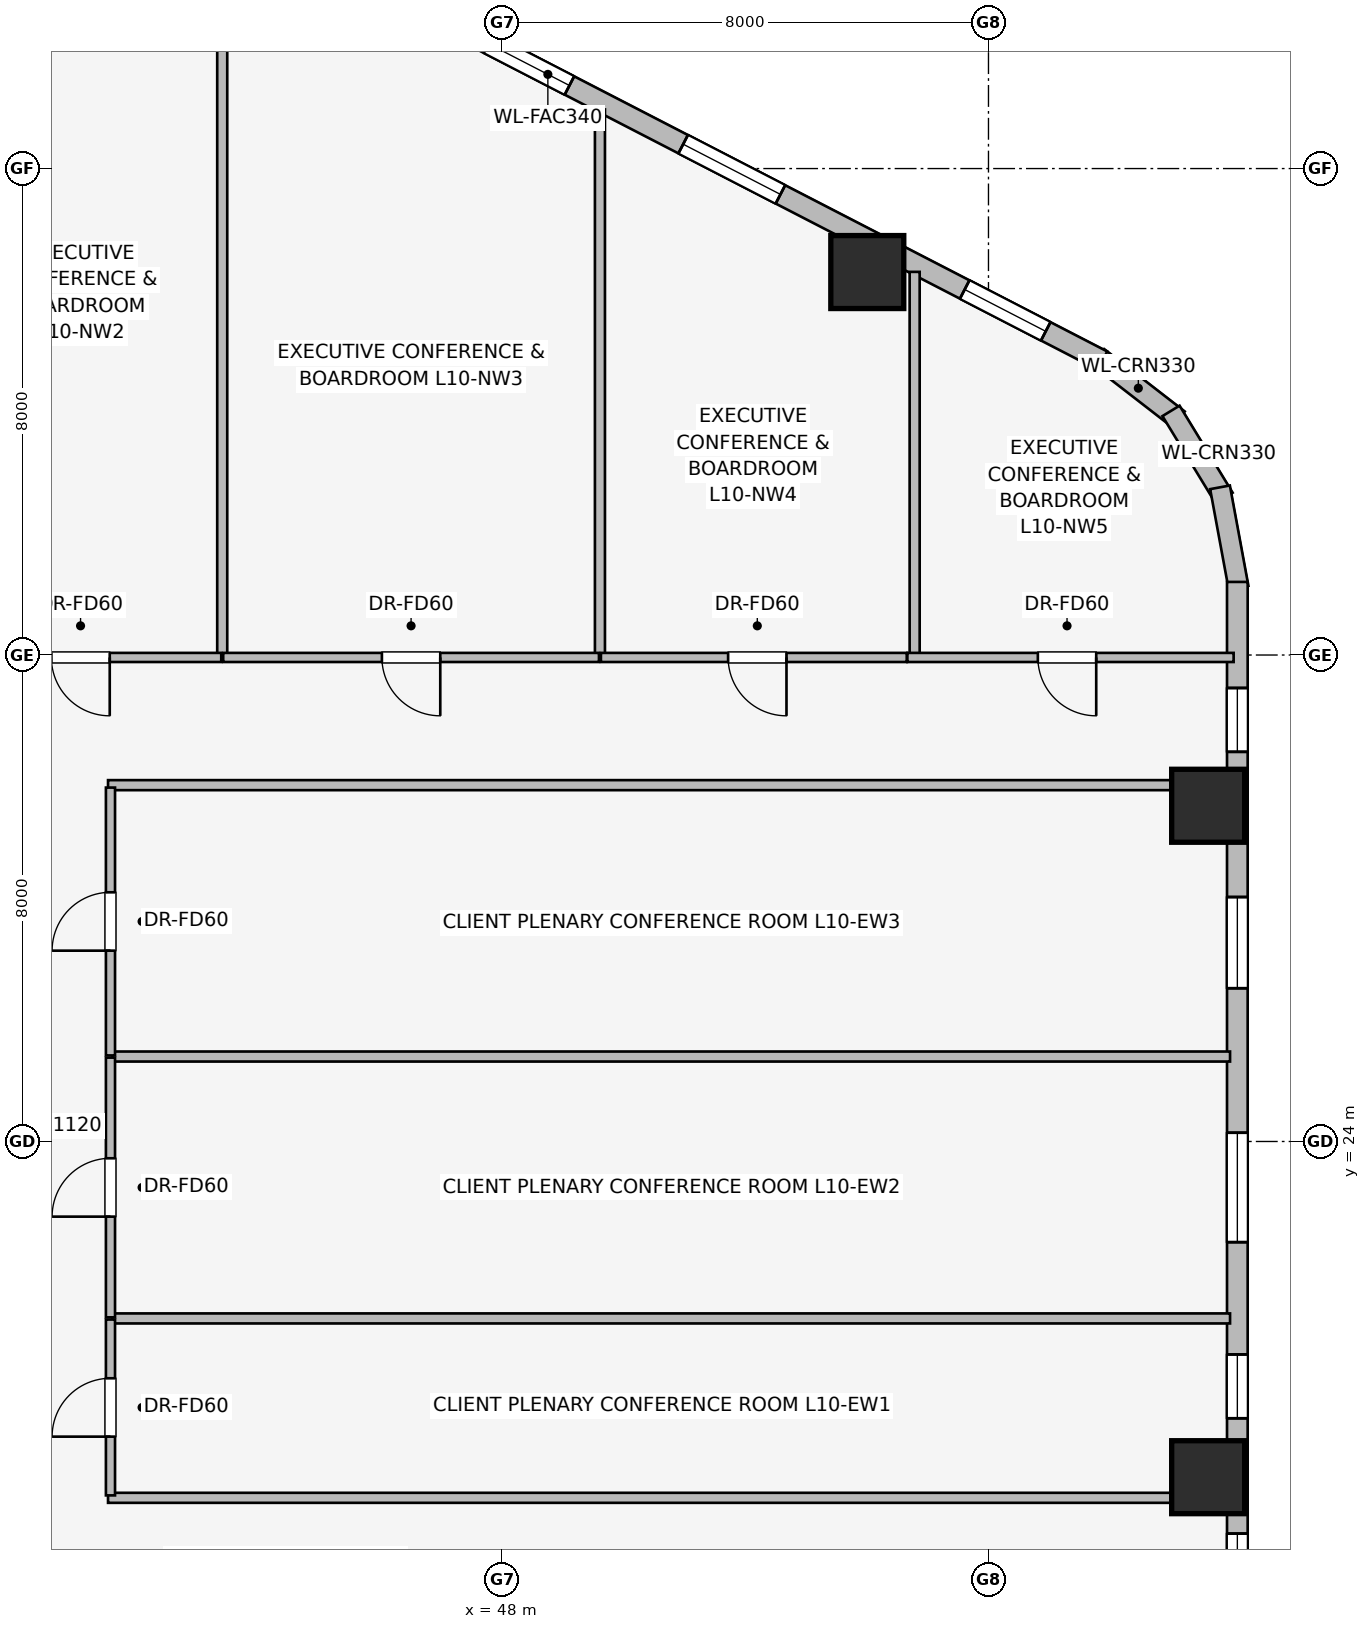
"""IFC4 building model, lengths in metres.
Left out: names, types, materials, properties, quantities, classifications, styles, units other than length and angle.
Written with IfcOpenShell. Run it as: python <this file> out.ifc"""

import sys

from ifc_helpers import new_model, si_unit, direction, frame, frame_2d, origin, origin_2d, place, context, subcontext, project, spatial, rectangle, extrude, element, fill, save


model = new_model("IFC4")
c1 = context("Model", 3, precision=1e-05, world=origin(), true_north=direction((0.0, 1.0)))
c2 = subcontext(c1, "Body", "Model", "MODEL_VIEW")
j1 = project(units=[si_unit("LENGTHUNIT", "METRE"), si_unit("PLANEANGLEUNIT", "RADIAN")], contexts=[c1])
p1 = place(None, origin())
s1 = spatial("IfcSite", under=j1, at=p1, CompositionType="ELEMENT")
p2 = place(p1, origin())
s2 = spatial("IfcBuilding", under=s1, at=p2, CompositionType="ELEMENT")
p3 = place(p2, frame((0.0, 0.0, 41.6)))
s3 = spatial("IfcBuildingStorey", under=s2, at=p3, CompositionType="ELEMENT", Elevation=41.6)
for number, where, z_axis, x_axis in (
    (1, (54.007, 38.298, 0.0), (0.0, 0.0, 1.0), (1.0, 0.0, 0.0)),
    (2, (59.613, 18.479, 0.0), (0.0, 0.0, 1.0), (1.0, 0.0, 0.0)),
    (3, (59.613, 29.521, 0.0), (0.0, 0.0, 1.0), (1.0, 0.0, 0.0)),
):
    element("IfcColumn", number, at=place(p3, frame(where, z_axis=z_axis, x_axis=x_axis)), inside=s3, PredefinedType="COLUMN", context=c2, shape_type="SweptSolid", body=[
        extrude(rectangle(XDim=1.2, YDim=1.2, at=origin_2d()), origin(), (0.0, 0.0, 1.0), 3.65),
    ])
p4 = place(p3, frame((57.802, 36.901, 0.0), z_axis=(0.0, 0.0, 1.0), x_axis=(0.790691856293, -0.61221433207, 0.0)))
e4 = element("IfcWall", 4, at=p4, inside=s3, PredefinedType="STANDARD", context=c2, shape_type="SweptSolid", body=[
    extrude(rectangle(XDim=1.676, YDim=0.33, at=frame_2d((0.838, 0.0))), origin(), (0.0, 0.0, 1.0), 3.39),
])
p5 = place(p3, frame((59.002, 36.015, 0.0), z_axis=(0.0, 0.0, 1.0), x_axis=(0.520584129191, -0.853810379671, 0.0)))
e5 = element("IfcWall", 5, at=p5, inside=s3, PredefinedType="STANDARD", context=c2, shape_type="SweptSolid", body=[
    extrude(rectangle(XDim=1.677, YDim=0.33, at=frame_2d((0.838, 0.0))), origin(), (0.0, 0.0, 1.0), 3.39),
])
p6 = place(p3, frame((59.808, 34.758, 0.0), z_axis=(0.0, 0.0, 1.0), x_axis=(0.181714143354, -0.983351397063, 0.0)))
e6 = element("IfcWall", 6, at=p6, inside=s3, PredefinedType="STANDARD", context=c2, shape_type="SweptSolid", body=[
    extrude(rectangle(XDim=1.678, YDim=0.33, at=frame_2d((0.839, 0.0))), origin(), (0.0, 0.0, 1.0), 3.39),
])
p7 = place(p3, frame((39.631, 46.257, 0.0), z_axis=(0.0, 0.0, 1.0), x_axis=(0.888634413993, -0.458616264721, 0.0)))
e7 = element("IfcWall", 7, at=p7, inside=s3, PredefinedType="STANDARD", context=c2, shape_type="SweptSolid", body=[
    extrude(rectangle(XDim=20.531, YDim=0.34, at=frame_2d((10.266, 0.0))), origin(), (0.0, 0.0, 1.0), 2.684),
])
p8 = place(p7, frame((1.058, 0.0, 0.75)))
e8 = element("IfcOpeningElement", 8, at=p8, cuts=e7, PredefinedType="OPENING", context=c2, shape_type="SweptSolid", body=[
    extrude(rectangle(XDim=1.8, YDim=1.5, at=frame_2d((0.9, 0.75))), frame((0.0, 0.18, 0.0), z_axis=(0.0, -1.0, 0.0), x_axis=(1.0, 0.0, 0.0)), (0.0, 0.0, 1.0), 0.36),
])
p9 = place(p7, frame((5.11, 0.0, 0.75)))
e9 = element("IfcOpeningElement", 9, at=p9, cuts=e7, PredefinedType="OPENING", context=c2, shape_type="SweptSolid", body=[
    extrude(rectangle(XDim=1.5, YDim=1.5, at=frame_2d((0.75, 0.75))), frame((0.0, 0.18, 0.0), z_axis=(0.0, -1.0, 0.0), x_axis=(1.0, 0.0, 0.0)), (0.0, 0.0, 1.0), 0.36),
])
p10 = place(p7, frame((7.138, 0.0, 0.75)))
e10 = element("IfcOpeningElement", 10, at=p10, cuts=e7, PredefinedType="OPENING", context=c2, shape_type="SweptSolid", body=[
    extrude(rectangle(XDim=1.5, YDim=1.5, at=frame_2d((0.75, 0.75))), frame((0.0, 0.18, 0.0), z_axis=(0.0, -1.0, 0.0), x_axis=(1.0, 0.0, 0.0)), (0.0, 0.0, 1.0), 0.36),
])
p11 = place(p7, frame((9.165, 0.0, 0.75)))
e11 = element("IfcOpeningElement", 11, at=p11, cuts=e7, PredefinedType="OPENING", context=c2, shape_type="SweptSolid", body=[
    extrude(rectangle(XDim=1.5, YDim=1.5, at=frame_2d((0.75, 0.75))), frame((0.0, 0.18, 0.0), z_axis=(0.0, -1.0, 0.0), x_axis=(1.0, 0.0, 0.0)), (0.0, 0.0, 1.0), 0.36),
])
p12 = place(p7, frame((12.77, 0.0, 0.75)))
e12 = element("IfcOpeningElement", 12, at=p12, cuts=e7, PredefinedType="OPENING", context=c2, shape_type="SweptSolid", body=[
    extrude(rectangle(XDim=1.8, YDim=1.5, at=frame_2d((0.9, 0.75))), frame((0.0, 0.18, 0.0), z_axis=(0.0, -1.0, 0.0), x_axis=(1.0, 0.0, 0.0)), (0.0, 0.0, 1.0), 0.36),
])
p13 = place(p7, frame((17.98, 0.0, 0.75)))
e13 = element("IfcOpeningElement", 13, at=p13, cuts=e7, PredefinedType="OPENING", context=c2, shape_type="SweptSolid", body=[
    extrude(rectangle(XDim=1.5, YDim=1.5, at=frame_2d((0.75, 0.75))), frame((0.0, 0.18, 0.0), z_axis=(0.0, -1.0, 0.0), x_axis=(1.0, 0.0, 0.0)), (0.0, 0.0, 1.0), 0.36),
])
p14 = place(p3, frame((60.093, 33.202, 0.0), z_axis=(0.0, 0.0, 1.0), x_axis=(0.0, -1.0, 0.0)))
e14 = element("IfcWall", 14, at=p14, inside=s3, PredefinedType="STANDARD", context=c2, shape_type="SweptSolid", body=[
    extrude(rectangle(XDim=18.404, YDim=0.34, at=frame_2d((9.202, 0.0))), origin(), (0.0, 0.0, 1.0), 2.684),
])
p15 = place(p14, frame((1.744, 0.0, 0.75)))
e15 = element("IfcOpeningElement", 15, at=p15, cuts=e14, PredefinedType="OPENING", context=c2, shape_type="SweptSolid", body=[
    extrude(rectangle(XDim=1.05, YDim=1.4, at=frame_2d((0.525, 0.7))), frame((0.0, 0.18, 0.0), z_axis=(0.0, -1.0, 0.0), x_axis=(1.0, 0.0, 0.0)), (0.0, 0.0, 1.0), 0.36),
])
p16 = place(p14, frame((5.182, 0.0, 0.75)))
e16 = element("IfcOpeningElement", 16, at=p16, cuts=e14, PredefinedType="OPENING", context=c2, shape_type="SweptSolid", body=[
    extrude(rectangle(XDim=1.5, YDim=1.5, at=frame_2d((0.75, 0.75))), frame((0.0, 0.18, 0.0), z_axis=(0.0, -1.0, 0.0), x_axis=(1.0, 0.0, 0.0)), (0.0, 0.0, 1.0), 0.36),
])
p17 = place(p14, frame((9.058, 0.0, 0.75)))
e17 = element("IfcOpeningElement", 17, at=p17, cuts=e14, PredefinedType="OPENING", context=c2, shape_type="SweptSolid", body=[
    extrude(rectangle(XDim=1.8, YDim=1.5, at=frame_2d((0.9, 0.75))), frame((0.0, 0.18, 0.0), z_axis=(0.0, -1.0, 0.0), x_axis=(1.0, 0.0, 0.0)), (0.0, 0.0, 1.0), 0.36),
])
p18 = place(p14, frame((12.704, 0.0, 0.75)))
e18 = element("IfcOpeningElement", 18, at=p18, cuts=e14, PredefinedType="OPENING", context=c2, shape_type="SweptSolid", body=[
    extrude(rectangle(XDim=1.05, YDim=1.4, at=frame_2d((0.525, 0.7))), frame((0.0, 0.18, 0.0), z_axis=(0.0, -1.0, 0.0), x_axis=(1.0, 0.0, 0.0)), (0.0, 0.0, 1.0), 0.36),
])
p19 = place(p14, frame((15.65, 0.0, 0.75)))
e19 = element("IfcOpeningElement", 19, at=p19, cuts=e14, PredefinedType="OPENING", context=c2, shape_type="SweptSolid", body=[
    extrude(rectangle(XDim=1.05, YDim=1.4, at=frame_2d((0.525, 0.7))), frame((0.0, 0.18, 0.0), z_axis=(0.0, -1.0, 0.0), x_axis=(1.0, 0.0, 0.0)), (0.0, 0.0, 1.0), 0.36),
])
p20 = place(p3, frame((43.398, 31.97, 0.0), z_axis=(0.0, 0.0, 1.0), x_axis=(0.0, 1.0, 0.0)))
e20 = element("IfcWall", 20, at=p20, inside=s3, PredefinedType="PARTITIONING", context=c2, shape_type="SweptSolid", body=[
    extrude(rectangle(XDim=12.208, YDim=0.165, at=frame_2d((6.104, 0.0))), origin(), (0.0, 0.0, 1.0), 2.513),
])
p21 = place(p3, frame((49.61, 31.97, 0.0), z_axis=(0.0, 0.0, 1.0), x_axis=(0.0, 1.0, 0.0)))
e21 = element("IfcWall", 21, at=p21, inside=s3, PredefinedType="PARTITIONING", context=c2, shape_type="SweptSolid", body=[
    extrude(rectangle(XDim=9.002, YDim=0.165, at=frame_2d((4.501, 0.0))), origin(), (0.0, 0.0, 1.0), 3.39),
])
p22 = place(p3, frame((54.786, 31.97, 0.0), z_axis=(0.0, 0.0, 1.0), x_axis=(0.0, 1.0, 0.0)))
e22 = element("IfcWall", 22, at=p22, inside=s3, PredefinedType="PARTITIONING", context=c2, shape_type="SweptSolid", body=[
    extrude(rectangle(XDim=6.331, YDim=0.165, at=frame_2d((3.166, 0.0))), origin(), (0.0, 0.0, 1.0), 3.39),
])
p23 = place(p3, frame((43.382, 31.96, 0.0), z_axis=(0.0, 0.0, 1.0), x_axis=(-1.0, 0.0, 0.0)))
e23 = element("IfcWall", 23, at=p23, inside=s3, PredefinedType="PARTITIONING", context=c2, shape_type="SweptSolid", body=[
    extrude(rectangle(XDim=4.513, YDim=0.15, at=frame_2d((2.257, 0.0))), origin(), (0.0, 0.0, 1.0), 3.39),
])
p24 = place(p23, frame((1.834, 0.0, 0.0)))
e24 = element("IfcOpeningElement", 24, at=p24, cuts=e23, PredefinedType="OPENING", context=c2, shape_type="SweptSolid", body=[
    extrude(rectangle(XDim=0.96, YDim=2.0, at=frame_2d((0.48, 1.0))), frame((0.0, 0.085, 0.0), z_axis=(0.0, -1.0, 0.0), x_axis=(1.0, 0.0, 0.0)), (0.0, 0.0, 1.0), 0.17),
])
p25 = place(p3, frame((49.594, 31.96, 0.0), z_axis=(0.0, 0.0, 1.0), x_axis=(-1.0, 0.0, 0.0)))
e25 = element("IfcWall", 25, at=p25, inside=s3, PredefinedType="PARTITIONING", context=c2, shape_type="SweptSolid", body=[
    extrude(rectangle(XDim=6.18, YDim=0.15, at=frame_2d((3.09, 0.0))), origin(), (0.0, 0.0, 1.0), 3.39),
])
p26 = place(p25, frame((2.61, 0.0, 0.0)))
e26 = element("IfcOpeningElement", 26, at=p26, cuts=e25, PredefinedType="OPENING", context=c2, shape_type="SweptSolid", body=[
    extrude(rectangle(XDim=0.96, YDim=2.0, at=frame_2d((0.48, 1.0))), frame((0.0, 0.085, 0.0), z_axis=(0.0, -1.0, 0.0), x_axis=(1.0, 0.0, 0.0)), (0.0, 0.0, 1.0), 0.17),
])
p27 = place(p3, frame((54.656, 31.96, 0.0), z_axis=(0.0, 0.0, 1.0), x_axis=(-1.0, 0.0, 0.0)))
e27 = element("IfcWall", 27, at=p27, inside=s3, PredefinedType="PARTITIONING", context=c2, shape_type="SweptSolid", body=[
    extrude(rectangle(XDim=5.03, YDim=0.15, at=frame_2d((2.515, 0.0))), origin(), (0.0, 0.0, 1.0), 3.39),
])
p28 = place(p27, frame((1.978, 0.0, 0.0)))
e28 = element("IfcOpeningElement", 28, at=p28, cuts=e27, PredefinedType="OPENING", context=c2, shape_type="SweptSolid", body=[
    extrude(rectangle(XDim=0.96, YDim=2.0, at=frame_2d((0.48, 1.0))), frame((0.0, 0.085, 0.0), z_axis=(0.0, -1.0, 0.0), x_axis=(1.0, 0.0, 0.0)), (0.0, 0.0, 1.0), 0.17),
])
p29 = place(p3, frame((60.032, 31.96, 0.0), z_axis=(0.0, 0.0, 1.0), x_axis=(-1.0, 0.0, 0.0)))
e29 = element("IfcWall", 29, at=p29, inside=s3, PredefinedType="PARTITIONING", context=c2, shape_type="SweptSolid", body=[
    extrude(rectangle(XDim=5.366, YDim=0.15, at=frame_2d((2.683, 0.0))), origin(), (0.0, 0.0, 1.0), 3.39),
])
p30 = place(p29, frame((2.26, 0.0, 0.0)))
e30 = element("IfcOpeningElement", 30, at=p30, cuts=e29, PredefinedType="OPENING", context=c2, shape_type="SweptSolid", body=[
    extrude(rectangle(XDim=0.96, YDim=2.0, at=frame_2d((0.48, 1.0))), frame((0.0, 0.085, 0.0), z_axis=(0.0, -1.0, 0.0), x_axis=(1.0, 0.0, 0.0)), (0.0, 0.0, 1.0), 0.17),
])
for number, where, z_axis, x_axis in (
    (31, (41.52, 18.14, 0.0), (0.0, 0.0, 1.0), (1.0, 0.0, 0.0)),
    (32, (41.52, 29.86, 0.0), (0.0, 0.0, 1.0), (1.0, 0.0, 0.0)),
):
    element("IfcWall", number, at=place(p3, frame(where, z_axis=z_axis, x_axis=x_axis)), inside=s3, PredefinedType="PARTITIONING", context=c2, shape_type="SweptSolid", body=[
        extrude(rectangle(XDim=18.453, YDim=0.165, at=frame_2d((9.227, 0.0))), origin(), (0.0, 0.0, 1.0), 2.298),
    ])
for number, where, z_axis, x_axis in (
    (33, (41.59, 21.09, 0.0), (0.0, 0.0, 1.0), (1.0, 0.0, 0.0)),
    (34, (41.59, 25.397, 0.0), (0.0, 0.0, 1.0), (1.0, 0.0, 0.0)),
):
    element("IfcWall", number, at=place(p3, frame(where, z_axis=z_axis, x_axis=x_axis)), inside=s3, PredefinedType="PARTITIONING", context=c2, shape_type="SweptSolid", body=[
        extrude(rectangle(XDim=18.383, YDim=0.165, at=frame_2d((9.191, 0.0))), origin(), (0.0, 0.0, 1.0), 3.39),
    ])
p31 = place(p3, frame((41.56, 18.18, 0.0), z_axis=(0.0, 0.0, 1.0), x_axis=(0.0, 1.0, 0.0)))
e35 = element("IfcWall", 35, at=p31, inside=s3, PredefinedType="PARTITIONING", context=c2, shape_type="SweptSolid", body=[
    extrude(rectangle(XDim=2.892, YDim=0.15, at=frame_2d((1.446, 0.0))), origin(), (0.0, 0.0, 1.0), 3.39),
])
p32 = place(p31, frame((0.966, 0.0, 0.0)))
e36 = element("IfcOpeningElement", 36, at=p32, cuts=e35, PredefinedType="OPENING", context=c2, shape_type="SweptSolid", body=[
    extrude(rectangle(XDim=0.96, YDim=2.0, at=frame_2d((0.48, 1.0))), frame((0.0, 0.085, 0.0), z_axis=(0.0, -1.0, 0.0), x_axis=(1.0, 0.0, 0.0)), (0.0, 0.0, 1.0), 0.17),
])
p33 = place(p3, frame((41.56, 21.108, 0.0), z_axis=(0.0, 0.0, 1.0), x_axis=(0.0, 1.0, 0.0)))
e37 = element("IfcWall", 37, at=p33, inside=s3, PredefinedType="PARTITIONING", context=c2, shape_type="SweptSolid", body=[
    extrude(rectangle(XDim=4.271, YDim=0.15, at=frame_2d((2.135, 0.0))), origin(), (0.0, 0.0, 1.0), 3.39),
])
p34 = place(p33, frame((1.656, 0.0, 0.0)))
e38 = element("IfcOpeningElement", 38, at=p34, cuts=e37, PredefinedType="OPENING", context=c2, shape_type="SweptSolid", body=[
    extrude(rectangle(XDim=0.96, YDim=2.0, at=frame_2d((0.48, 1.0))), frame((0.0, 0.085, 0.0), z_axis=(0.0, -1.0, 0.0), x_axis=(1.0, 0.0, 0.0)), (0.0, 0.0, 1.0), 0.17),
])
p35 = place(p3, frame((41.56, 25.415, 0.0), z_axis=(0.0, 0.0, 1.0), x_axis=(0.0, 1.0, 0.0)))
e39 = element("IfcWall", 39, at=p35, inside=s3, PredefinedType="PARTITIONING", context=c2, shape_type="SweptSolid", body=[
    extrude(rectangle(XDim=4.405, YDim=0.15, at=frame_2d((2.203, 0.0))), origin(), (0.0, 0.0, 1.0), 3.39),
])
p36 = place(p35, frame((1.723, 0.0, 0.0)))
e40 = element("IfcOpeningElement", 40, at=p36, cuts=e39, PredefinedType="OPENING", context=c2, shape_type="SweptSolid", body=[
    extrude(rectangle(XDim=0.96, YDim=2.0, at=frame_2d((0.48, 1.0))), frame((0.0, 0.085, 0.0), z_axis=(0.0, -1.0, 0.0), x_axis=(1.0, 0.0, 0.0)), (0.0, 0.0, 1.0), 0.17),
])
p37 = place(p11, origin())
e41 = element("IfcWindow", 41, at=p37, inside=s3, PartitioningType="SINGLE_PANEL", PredefinedType="WINDOW", context=c2, shape_type="SweptSolid", body=[
    extrude(rectangle(XDim=1.5, YDim=1.5, at=frame_2d((0.75, 0.75))), frame((0.0, 0.03, 0.0), z_axis=(0.0, -1.0, 0.0), x_axis=(1.0, 0.0, 0.0)), (0.0, 0.0, 1.0), 0.06),
])
fill(e11, e41)
p38 = place(p12, origin())
e42 = element("IfcWindow", 42, at=p38, inside=s3, PartitioningType="SINGLE_PANEL", PredefinedType="WINDOW", context=c2, shape_type="SweptSolid", body=[
    extrude(rectangle(XDim=1.8, YDim=1.5, at=frame_2d((0.9, 0.75))), frame((0.0, 0.03, 0.0), z_axis=(0.0, -1.0, 0.0), x_axis=(1.0, 0.0, 0.0)), (0.0, 0.0, 1.0), 0.06),
])
fill(e12, e42)
p39 = place(p13, origin())
e43 = element("IfcWindow", 43, at=p39, inside=s3, PartitioningType="SINGLE_PANEL", PredefinedType="WINDOW", context=c2, shape_type="SweptSolid", body=[
    extrude(rectangle(XDim=1.5, YDim=1.5, at=frame_2d((0.75, 0.75))), frame((0.0, 0.03, 0.0), z_axis=(0.0, -1.0, 0.0), x_axis=(1.0, 0.0, 0.0)), (0.0, 0.0, 1.0), 0.06),
])
fill(e13, e43)
p40 = place(p15, origin())
e44 = element("IfcWindow", 44, at=p40, inside=s3, PartitioningType="SINGLE_PANEL", PredefinedType="WINDOW", context=c2, shape_type="SweptSolid", body=[
    extrude(rectangle(XDim=1.05, YDim=1.4, at=frame_2d((0.525, 0.7))), frame((0.0, 0.03, 0.0), z_axis=(0.0, -1.0, 0.0), x_axis=(1.0, 0.0, 0.0)), (0.0, 0.0, 1.0), 0.06),
])
fill(e15, e44)
p41 = place(p16, origin())
e45 = element("IfcWindow", 45, at=p41, inside=s3, PartitioningType="SINGLE_PANEL", PredefinedType="WINDOW", context=c2, shape_type="SweptSolid", body=[
    extrude(rectangle(XDim=1.5, YDim=1.5, at=frame_2d((0.75, 0.75))), frame((0.0, 0.03, 0.0), z_axis=(0.0, -1.0, 0.0), x_axis=(1.0, 0.0, 0.0)), (0.0, 0.0, 1.0), 0.06),
])
fill(e16, e45)
p42 = place(p17, origin())
e46 = element("IfcWindow", 46, at=p42, inside=s3, PartitioningType="SINGLE_PANEL", PredefinedType="WINDOW", context=c2, shape_type="SweptSolid", body=[
    extrude(rectangle(XDim=1.8, YDim=1.5, at=frame_2d((0.9, 0.75))), frame((0.0, 0.03, 0.0), z_axis=(0.0, -1.0, 0.0), x_axis=(1.0, 0.0, 0.0)), (0.0, 0.0, 1.0), 0.06),
])
fill(e17, e46)
p43 = place(p18, origin())
e47 = element("IfcWindow", 47, at=p43, inside=s3, PartitioningType="SINGLE_PANEL", PredefinedType="WINDOW", context=c2, shape_type="SweptSolid", body=[
    extrude(rectangle(XDim=1.05, YDim=1.4, at=frame_2d((0.525, 0.7))), frame((0.0, 0.03, 0.0), z_axis=(0.0, -1.0, 0.0), x_axis=(1.0, 0.0, 0.0)), (0.0, 0.0, 1.0), 0.06),
])
fill(e18, e47)
p44 = place(p19, origin())
e48 = element("IfcWindow", 48, at=p44, inside=s3, PartitioningType="SINGLE_PANEL", PredefinedType="WINDOW", context=c2, shape_type="SweptSolid", body=[
    extrude(rectangle(XDim=1.05, YDim=1.4, at=frame_2d((0.525, 0.7))), frame((0.0, 0.03, 0.0), z_axis=(0.0, -1.0, 0.0), x_axis=(1.0, 0.0, 0.0)), (0.0, 0.0, 1.0), 0.06),
])
fill(e19, e48)
p45 = place(p24, origin())
e49 = element("IfcDoor", 49, at=p45, inside=s3, OperationType="SINGLE_SWING_LEFT", PredefinedType="DOOR", context=c2, shape_type="SweptSolid", body=[
    extrude(rectangle(XDim=0.96, YDim=2.0, at=frame_2d((0.48, 1.0))), frame((0.0, 0.025, 0.0), z_axis=(0.0, -1.0, 0.0), x_axis=(1.0, 0.0, 0.0)), (0.0, 0.0, 1.0), 0.05),
])
fill(e24, e49)
p46 = place(p26, origin())
e50 = element("IfcDoor", 50, at=p46, inside=s3, OperationType="SINGLE_SWING_LEFT", PredefinedType="DOOR", context=c2, shape_type="SweptSolid", body=[
    extrude(rectangle(XDim=0.96, YDim=2.0, at=frame_2d((0.48, 1.0))), frame((0.0, 0.025, 0.0), z_axis=(0.0, -1.0, 0.0), x_axis=(1.0, 0.0, 0.0)), (0.0, 0.0, 1.0), 0.05),
])
fill(e26, e50)
p47 = place(p28, origin())
e51 = element("IfcDoor", 51, at=p47, inside=s3, OperationType="SINGLE_SWING_LEFT", PredefinedType="DOOR", context=c2, shape_type="SweptSolid", body=[
    extrude(rectangle(XDim=0.96, YDim=2.0, at=frame_2d((0.48, 1.0))), frame((0.0, 0.025, 0.0), z_axis=(0.0, -1.0, 0.0), x_axis=(1.0, 0.0, 0.0)), (0.0, 0.0, 1.0), 0.05),
])
fill(e28, e51)
p48 = place(p30, origin())
e52 = element("IfcDoor", 52, at=p48, inside=s3, OperationType="SINGLE_SWING_LEFT", PredefinedType="DOOR", context=c2, shape_type="SweptSolid", body=[
    extrude(rectangle(XDim=0.96, YDim=2.0, at=frame_2d((0.48, 1.0))), frame((0.0, 0.025, 0.0), z_axis=(0.0, -1.0, 0.0), x_axis=(1.0, 0.0, 0.0)), (0.0, 0.0, 1.0), 0.05),
])
fill(e30, e52)
p49 = place(p32, origin())
e53 = element("IfcDoor", 53, at=p49, inside=s3, OperationType="SINGLE_SWING_LEFT", PredefinedType="DOOR", context=c2, shape_type="SweptSolid", body=[
    extrude(rectangle(XDim=0.96, YDim=2.0, at=frame_2d((0.48, 1.0))), frame((0.0, 0.025, 0.0), z_axis=(0.0, -1.0, 0.0), x_axis=(1.0, 0.0, 0.0)), (0.0, 0.0, 1.0), 0.05),
])
fill(e36, e53)
p50 = place(p34, origin())
e54 = element("IfcDoor", 54, at=p50, inside=s3, OperationType="SINGLE_SWING_LEFT", PredefinedType="DOOR", context=c2, shape_type="SweptSolid", body=[
    extrude(rectangle(XDim=0.96, YDim=2.0, at=frame_2d((0.48, 1.0))), frame((0.0, 0.025, 0.0), z_axis=(0.0, -1.0, 0.0), x_axis=(1.0, 0.0, 0.0)), (0.0, 0.0, 1.0), 0.05),
])
fill(e38, e54)
p51 = place(p36, origin())
e55 = element("IfcDoor", 55, at=p51, inside=s3, OperationType="SINGLE_SWING_LEFT", PredefinedType="DOOR", context=c2, shape_type="SweptSolid", body=[
    extrude(rectangle(XDim=0.96, YDim=2.0, at=frame_2d((0.48, 1.0))), frame((0.0, 0.025, 0.0), z_axis=(0.0, -1.0, 0.0), x_axis=(1.0, 0.0, 0.0)), (0.0, 0.0, 1.0), 0.05),
])
fill(e40, e55)
save(model, sys.argv[1])
